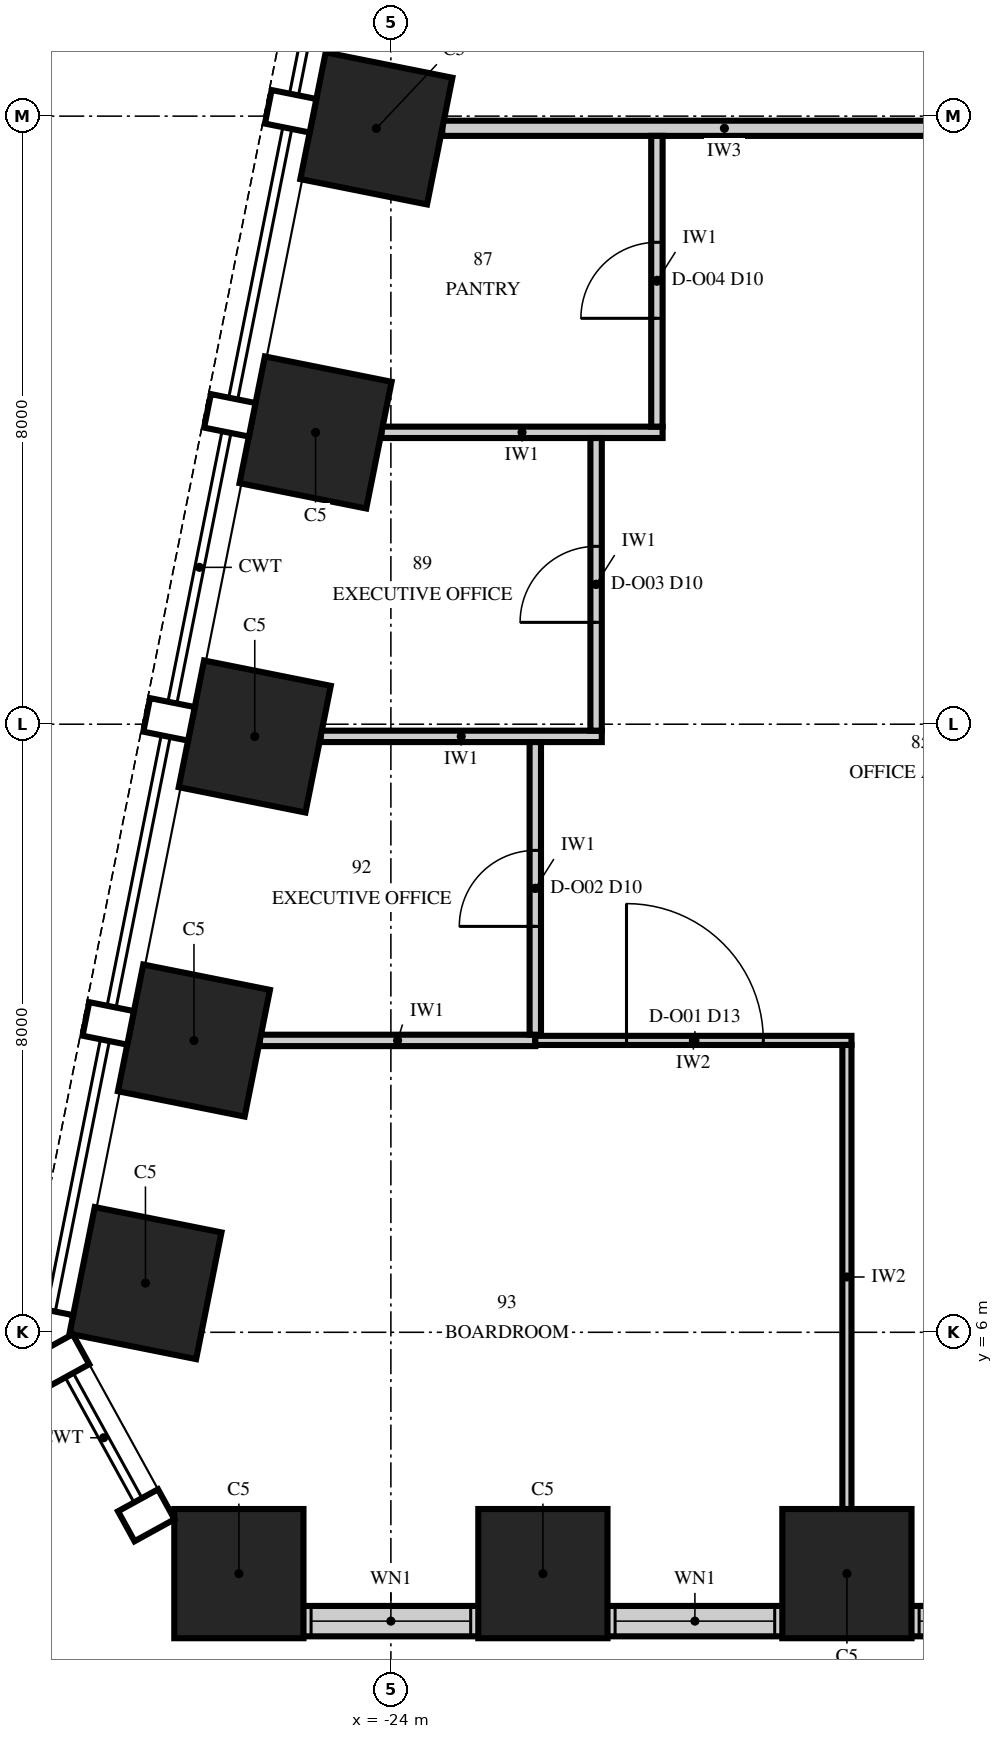
"""IFC4 building model, lengths in metres.
Left out: names, types, materials, properties, quantities, classifications, styles, units other than length and angle.
Written with IfcOpenShell. Run it as: python <this file> out.ifc"""

import sys

from ifc_helpers import new_model, si_unit, direction, frame, frame_2d, origin, origin_2d, place, context, subcontext, project, spatial, rectangle, extrude, element, fill, save


model = new_model("IFC4")
c1 = context("Model", 3, precision=1e-05, world=origin(), true_north=direction((0.0, 1.0)))
c2 = subcontext(c1, "Body", "Model", "MODEL_VIEW")
j1 = project(units=[si_unit("LENGTHUNIT", "METRE"), si_unit("PLANEANGLEUNIT", "RADIAN")], contexts=[c1])
p1 = place(None, origin())
s1 = spatial("IfcSite", under=j1, at=p1, CompositionType="ELEMENT")
p2 = place(p1, origin())
s2 = spatial("IfcBuilding", under=s1, at=p2, CompositionType="ELEMENT")
p3 = place(p2, frame((0.0, 0.0, 312.0)))
s3 = spatial("IfcBuildingStorey", under=s2, at=p3, CompositionType="ELEMENT", Elevation=312.0)
for number, where, z_axis, x_axis in (
    (1, (-26.0, 2.825, 0.0), (0.0, 0.0, 1.0), (1.0, 0.0, 0.0)),
    (2, (-22.0, 2.825, 0.0), (0.0, 0.0, 1.0), (1.0, 0.0, 0.0)),
    (3, (-18.0, 2.825, 0.0), (0.0, 0.0, 1.0), (1.0, 0.0, 0.0)),
    (4, (-24.191, 21.838, 0.0), (0.0, 0.0, 1.0), (-0.196, -0.981, 0.0)),
    (5, (-24.991, 17.838, 0.0), (0.0, 0.0, 1.0), (-0.196, -0.981, 0.0)),
    (6, (-25.791, 13.838, 0.0), (0.0, 0.0, 1.0), (-0.196, -0.981, 0.0)),
    (7, (-26.591, 9.838, 0.0), (0.0, 0.0, 1.0), (-0.196, -0.981, 0.0)),
    (8, (-27.229, 6.647, 0.0), (0.0, 0.0, 1.0), (-0.196, -0.981, 0.0)),
):
    element("IfcColumn", number, at=place(p3, frame(where, z_axis=z_axis, x_axis=x_axis)), inside=s3, PredefinedType="COLUMN", context=c2, shape_type="SweptSolid", body=[
        extrude(rectangle(XDim=1.7, YDim=1.7, at=origin_2d()), origin(), (0.0, 0.0, 1.0), 4.0),
    ])
p4 = place(p3, frame((-26.0, 2.2, 0.0), z_axis=(0.0, 0.0, 1.0), x_axis=(1.0, 0.0, 0.0)))
e9 = element("IfcWall", 9, at=p4, inside=s3, PredefinedType="SOLIDWALL", context=c2, shape_type="SweptSolid", body=[
    extrude(rectangle(XDim=52.0, YDim=0.4, at=frame_2d((26.0, 0.0))), origin(), (0.0, 0.0, 1.0), 2.0),
])
p5 = place(p4, frame((0.95, 0.0, 0.8)))
e10 = element("IfcOpeningElement", 10, at=p5, cuts=e9, PredefinedType="OPENING", context=c2, shape_type="SweptSolid", body=[
    extrude(rectangle(XDim=2.1, YDim=1.15, at=frame_2d((1.05, 0.575))), frame((0.0, 0.215, 0.0), z_axis=(0.0, -1.0, 0.0), x_axis=(1.0, 0.0, 0.0)), (0.0, 0.0, 1.0), 0.43),
])
p6 = place(p4, frame((4.95, 0.0, 0.8)))
e11 = element("IfcOpeningElement", 11, at=p6, cuts=e9, PredefinedType="OPENING", context=c2, shape_type="SweptSolid", body=[
    extrude(rectangle(XDim=2.1, YDim=1.15, at=frame_2d((1.05, 0.575))), frame((0.0, 0.215, 0.0), z_axis=(0.0, -1.0, 0.0), x_axis=(1.0, 0.0, 0.0)), (0.0, 0.0, 1.0), 0.43),
])
p7 = place(p4, frame((8.95, 0.0, 0.8)))
e12 = element("IfcOpeningElement", 12, at=p7, cuts=e9, PredefinedType="OPENING", context=c2, shape_type="SweptSolid", body=[
    extrude(rectangle(XDim=2.1, YDim=1.15, at=frame_2d((1.05, 0.575))), frame((0.0, 0.215, 0.0), z_axis=(0.0, -1.0, 0.0), x_axis=(1.0, 0.0, 0.0)), (0.0, 0.0, 1.0), 0.43),
])
p8 = place(p4, frame((12.95, 0.0, 0.8)))
e13 = element("IfcOpeningElement", 13, at=p8, cuts=e9, PredefinedType="OPENING", context=c2, shape_type="SweptSolid", body=[
    extrude(rectangle(XDim=2.1, YDim=1.15, at=frame_2d((1.05, 0.575))), frame((0.0, 0.215, 0.0), z_axis=(0.0, -1.0, 0.0), x_axis=(1.0, 0.0, 0.0)), (0.0, 0.0, 1.0), 0.43),
])
p9 = place(p4, frame((16.95, 0.0, 0.8)))
e14 = element("IfcOpeningElement", 14, at=p9, cuts=e9, PredefinedType="OPENING", context=c2, shape_type="SweptSolid", body=[
    extrude(rectangle(XDim=2.1, YDim=1.15, at=frame_2d((1.05, 0.575))), frame((0.0, 0.215, 0.0), z_axis=(0.0, -1.0, 0.0), x_axis=(1.0, 0.0, 0.0)), (0.0, 0.0, 1.0), 0.43),
])
p10 = place(p4, frame((20.95, 0.0, 0.8)))
e15 = element("IfcOpeningElement", 15, at=p10, cuts=e9, PredefinedType="OPENING", context=c2, shape_type="SweptSolid", body=[
    extrude(rectangle(XDim=2.1, YDim=1.15, at=frame_2d((1.05, 0.575))), frame((0.0, 0.215, 0.0), z_axis=(0.0, -1.0, 0.0), x_axis=(1.0, 0.0, 0.0)), (0.0, 0.0, 1.0), 0.43),
])
p11 = place(p4, frame((24.95, 0.0, 0.8)))
e16 = element("IfcOpeningElement", 16, at=p11, cuts=e9, PredefinedType="OPENING", context=c2, shape_type="SweptSolid", body=[
    extrude(rectangle(XDim=2.1, YDim=1.15, at=frame_2d((1.05, 0.575))), frame((0.0, 0.215, 0.0), z_axis=(0.0, -1.0, 0.0), x_axis=(1.0, 0.0, 0.0)), (0.0, 0.0, 1.0), 0.43),
])
p12 = place(p4, frame((28.95, 0.0, 0.8)))
e17 = element("IfcOpeningElement", 17, at=p12, cuts=e9, PredefinedType="OPENING", context=c2, shape_type="SweptSolid", body=[
    extrude(rectangle(XDim=2.1, YDim=1.15, at=frame_2d((1.05, 0.575))), frame((0.0, 0.215, 0.0), z_axis=(0.0, -1.0, 0.0), x_axis=(1.0, 0.0, 0.0)), (0.0, 0.0, 1.0), 0.43),
])
p13 = place(p4, frame((32.95, 0.0, 0.8)))
e18 = element("IfcOpeningElement", 18, at=p13, cuts=e9, PredefinedType="OPENING", context=c2, shape_type="SweptSolid", body=[
    extrude(rectangle(XDim=2.1, YDim=1.15, at=frame_2d((1.05, 0.575))), frame((0.0, 0.215, 0.0), z_axis=(0.0, -1.0, 0.0), x_axis=(1.0, 0.0, 0.0)), (0.0, 0.0, 1.0), 0.43),
])
p14 = place(p4, frame((36.95, 0.0, 0.8)))
e19 = element("IfcOpeningElement", 19, at=p14, cuts=e9, PredefinedType="OPENING", context=c2, shape_type="SweptSolid", body=[
    extrude(rectangle(XDim=2.1, YDim=1.15, at=frame_2d((1.05, 0.575))), frame((0.0, 0.215, 0.0), z_axis=(0.0, -1.0, 0.0), x_axis=(1.0, 0.0, 0.0)), (0.0, 0.0, 1.0), 0.43),
])
p15 = place(p4, frame((40.95, 0.0, 0.8)))
e20 = element("IfcOpeningElement", 20, at=p15, cuts=e9, PredefinedType="OPENING", context=c2, shape_type="SweptSolid", body=[
    extrude(rectangle(XDim=2.1, YDim=1.15, at=frame_2d((1.05, 0.575))), frame((0.0, 0.215, 0.0), z_axis=(0.0, -1.0, 0.0), x_axis=(1.0, 0.0, 0.0)), (0.0, 0.0, 1.0), 0.43),
])
p16 = place(p4, frame((44.95, 0.0, 0.8)))
e21 = element("IfcOpeningElement", 21, at=p16, cuts=e9, PredefinedType="OPENING", context=c2, shape_type="SweptSolid", body=[
    extrude(rectangle(XDim=2.1, YDim=1.15, at=frame_2d((1.05, 0.575))), frame((0.0, 0.215, 0.0), z_axis=(0.0, -1.0, 0.0), x_axis=(1.0, 0.0, 0.0)), (0.0, 0.0, 1.0), 0.43),
])
p17 = place(p4, frame((48.95, 0.0, 0.8)))
e22 = element("IfcOpeningElement", 22, at=p17, cuts=e9, PredefinedType="OPENING", context=c2, shape_type="SweptSolid", body=[
    extrude(rectangle(XDim=2.1, YDim=1.15, at=frame_2d((1.05, 0.575))), frame((0.0, 0.215, 0.0), z_axis=(0.0, -1.0, 0.0), x_axis=(1.0, 0.0, 0.0)), (0.0, 0.0, 1.0), 0.43),
])
p18 = place(p3, frame((-25.724, 9.84, 0.0), z_axis=(0.0, 0.0, 1.0), x_axis=(1.0, 0.0, 0.0)))
e23 = element("IfcWall", 23, at=p18, inside=s3, PredefinedType="PARTITIONING", context=c2, shape_type="SweptSolid", body=[
    extrude(rectangle(XDim=3.624, YDim=0.15, at=frame_2d((1.812, 0.0))), origin(), (0.0, 0.0, 1.0), 3.23),
])
p19 = place(p3, frame((-22.1, 9.84, 0.0), z_axis=(0.0, 0.0, 1.0), x_axis=(1.0, 0.0, 0.0)))
e24 = element("IfcWall", 24, at=p19, inside=s3, PredefinedType="PARTITIONING", context=c2, shape_type="SweptSolid", body=[
    extrude(rectangle(XDim=4.16, YDim=0.12, at=frame_2d((2.08, 0.0))), origin(), (0.0, 0.0, 1.0), 3.85),
])
p20 = place(p19, frame((1.2, 0.0, 0.0)))
e25 = element("IfcOpeningElement", 25, at=p20, cuts=e24, PredefinedType="OPENING", context=c2, shape_type="SweptSolid", body=[
    extrude(rectangle(XDim=1.8, YDim=2.4, at=frame_2d((0.9, 1.2))), frame((0.0, 0.075, 0.0), z_axis=(0.0, -1.0, 0.0), x_axis=(1.0, 0.0, 0.0)), (0.0, 0.0, 1.0), 0.15),
])
for number, where, z_axis, x_axis in (
    (26, (-24.924, 13.84, 0.0), (0.0, 0.0, 1.0), (1.0, 0.0, 0.0)),
    (27, (-24.124, 17.84, 0.0), (0.0, 0.0, 1.0), (1.0, 0.0, 0.0)),
):
    element("IfcWall", number, at=place(p3, frame(where, z_axis=z_axis, x_axis=x_axis)), inside=s3, PredefinedType="PARTITIONING", context=c2, shape_type="SweptSolid", body=[
        extrude(rectangle(XDim=3.699, YDim=0.15, at=frame_2d((1.849, 0.0))), origin(), (0.0, 0.0, 1.0), 3.23),
    ])
p21 = place(p3, frame((-23.324, 21.84, 0.0), z_axis=(0.0, 0.0, 1.0), x_axis=(1.0, 0.0, 0.0)))
e28 = element("IfcWall", 28, at=p21, inside=s3, PredefinedType="PARTITIONING", context=c2, shape_type="SweptSolid", body=[
    extrude(rectangle(XDim=7.424, YDim=0.2, at=frame_2d((3.712, 0.0))), origin(), (0.0, 0.0, 1.0), 3.23),
])
p22 = place(p3, frame((-22.1, 9.915, 0.0), z_axis=(0.0, 0.0, 1.0), x_axis=(0.0, 1.0, 0.0)))
e29 = element("IfcWall", 29, at=p22, inside=s3, PredefinedType="PARTITIONING", context=c2, shape_type="SweptSolid", body=[
    extrude(rectangle(XDim=3.85, YDim=0.15, at=frame_2d((1.925, 0.0))), origin(), (0.0, 0.0, 1.0), 3.85),
])
p23 = place(p22, frame((1.425, 0.0, 0.0)))
e30 = element("IfcOpeningElement", 30, at=p23, cuts=e29, PredefinedType="OPENING", context=c2, shape_type="SweptSolid", body=[
    extrude(rectangle(XDim=1.0, YDim=2.3, at=frame_2d((0.5, 1.15))), frame((0.0, 0.09, 0.0), z_axis=(0.0, -1.0, 0.0), x_axis=(1.0, 0.0, 0.0)), (0.0, 0.0, 1.0), 0.18),
])
p24 = place(p3, frame((-21.3, 13.915, 0.0), z_axis=(0.0, 0.0, 1.0), x_axis=(0.0, 1.0, 0.0)))
e31 = element("IfcWall", 31, at=p24, inside=s3, PredefinedType="PARTITIONING", context=c2, shape_type="SweptSolid", body=[
    extrude(rectangle(XDim=3.85, YDim=0.15, at=frame_2d((1.925, 0.0))), origin(), (0.0, 0.0, 1.0), 3.23),
])
p25 = place(p24, frame((1.425, 0.0, 0.0)))
e32 = element("IfcOpeningElement", 32, at=p25, cuts=e31, PredefinedType="OPENING", context=c2, shape_type="SweptSolid", body=[
    extrude(rectangle(XDim=1.0, YDim=2.3, at=frame_2d((0.5, 1.15))), frame((0.0, 0.09, 0.0), z_axis=(0.0, -1.0, 0.0), x_axis=(1.0, 0.0, 0.0)), (0.0, 0.0, 1.0), 0.18),
])
p26 = place(p3, frame((-20.5, 17.915, 0.0), z_axis=(0.0, 0.0, 1.0), x_axis=(0.0, 1.0, 0.0)))
e33 = element("IfcWall", 33, at=p26, inside=s3, PredefinedType="PARTITIONING", context=c2, shape_type="SweptSolid", body=[
    extrude(rectangle(XDim=3.825, YDim=0.15, at=frame_2d((1.913, 0.0))), origin(), (0.0, 0.0, 1.0), 3.23),
])
p27 = place(p26, frame((1.425, 0.0, 0.0)))
e34 = element("IfcOpeningElement", 34, at=p27, cuts=e33, PredefinedType="OPENING", context=c2, shape_type="SweptSolid", body=[
    extrude(rectangle(XDim=1.0, YDim=2.3, at=frame_2d((0.5, 1.15))), frame((0.0, 0.09, 0.0), z_axis=(0.0, -1.0, 0.0), x_axis=(1.0, 0.0, 0.0)), (0.0, 0.0, 1.0), 0.18),
])
p28 = place(p3, frame((-18.0, 3.675, 0.0), z_axis=(0.0, 0.0, 1.0), x_axis=(0.0, 1.0, 0.0)))
e35 = element("IfcWall", 35, at=p28, inside=s3, PredefinedType="PARTITIONING", context=c2, shape_type="SweptSolid", body=[
    extrude(rectangle(XDim=6.105, YDim=0.12, at=frame_2d((3.052, 0.0))), origin(), (0.0, 0.0, 1.0), 2.842),
])
p29 = place(p5, origin())
e36 = element("IfcWindow", 36, at=p29, inside=s3, PartitioningType="SINGLE_PANEL", PredefinedType="WINDOW", context=c2, shape_type="SweptSolid", body=[
    extrude(rectangle(XDim=2.1, YDim=1.15, at=frame_2d((1.05, 0.575))), frame((0.0, 0.03, 0.0), z_axis=(0.0, -1.0, 0.0), x_axis=(1.0, 0.0, 0.0)), (0.0, 0.0, 1.0), 0.06),
])
fill(e10, e36)
p30 = place(p6, origin())
e37 = element("IfcWindow", 37, at=p30, inside=s3, PartitioningType="SINGLE_PANEL", PredefinedType="WINDOW", context=c2, shape_type="SweptSolid", body=[
    extrude(rectangle(XDim=2.1, YDim=1.15, at=frame_2d((1.05, 0.575))), frame((0.0, 0.03, 0.0), z_axis=(0.0, -1.0, 0.0), x_axis=(1.0, 0.0, 0.0)), (0.0, 0.0, 1.0), 0.06),
])
fill(e11, e37)
p31 = place(p7, origin())
e38 = element("IfcWindow", 38, at=p31, inside=s3, PartitioningType="SINGLE_PANEL", PredefinedType="WINDOW", context=c2, shape_type="SweptSolid", body=[
    extrude(rectangle(XDim=2.1, YDim=1.15, at=frame_2d((1.05, 0.575))), frame((0.0, 0.03, 0.0), z_axis=(0.0, -1.0, 0.0), x_axis=(1.0, 0.0, 0.0)), (0.0, 0.0, 1.0), 0.06),
])
fill(e12, e38)
p32 = place(p20, origin())
e39 = element("IfcDoor", 39, at=p32, inside=s3, OperationType="DOUBLE_DOOR_SINGLE_SWING", PredefinedType="DOOR", context=c2, shape_type="SweptSolid", body=[
    extrude(rectangle(XDim=1.8, YDim=2.4, at=frame_2d((0.9, 1.2))), frame((0.0, 0.06, 0.0), z_axis=(0.0, -1.0, 0.0), x_axis=(1.0, 0.0, 0.0)), (0.0, 0.0, 1.0), 0.12),
])
fill(e25, e39)
p33 = place(p23, origin())
e40 = element("IfcDoor", 40, at=p33, inside=s3, OperationType="SINGLE_SWING_LEFT", PredefinedType="DOOR", context=c2, shape_type="SweptSolid", body=[
    extrude(rectangle(XDim=1.0, YDim=2.3, at=frame_2d((0.5, 1.15))), frame((0.0, 0.075, 0.0), z_axis=(0.0, -1.0, 0.0), x_axis=(1.0, 0.0, 0.0)), (0.0, 0.0, 1.0), 0.149),
])
fill(e30, e40)
p34 = place(p25, origin())
e41 = element("IfcDoor", 41, at=p34, inside=s3, OperationType="SINGLE_SWING_LEFT", PredefinedType="DOOR", context=c2, shape_type="SweptSolid", body=[
    extrude(rectangle(XDim=1.0, YDim=2.3, at=frame_2d((0.5, 1.15))), frame((0.0, 0.075, 0.0), z_axis=(0.0, -1.0, 0.0), x_axis=(1.0, 0.0, 0.0)), (0.0, 0.0, 1.0), 0.149),
])
fill(e32, e41)
p35 = place(p27, origin())
e42 = element("IfcDoor", 42, at=p35, inside=s3, OperationType="SINGLE_SWING_LEFT", PredefinedType="DOOR", context=c2, shape_type="SweptSolid", body=[
    extrude(rectangle(XDim=1.0, YDim=2.3, at=frame_2d((0.5, 1.15))), frame((0.0, 0.075, 0.0), z_axis=(0.0, -1.0, 0.0), x_axis=(1.0, 0.0, 0.0)), (0.0, 0.0, 1.0), 0.149),
])
fill(e34, e42)
save(model, sys.argv[1])
